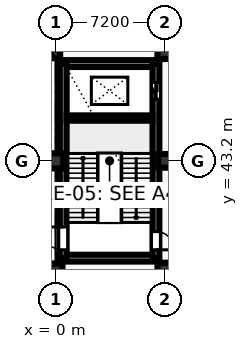
"""IFC4 building model, lengths in metres.
Left out: names, types, materials, properties, quantities, classifications, styles, units other than length and angle.
Written with IfcOpenShell. Run it as: python <this file> out.ifc"""

import sys

from ifc_helpers import new_model, si_unit, direction, frame, frame_2d, origin, origin_2d, place, context, subcontext, project, spatial, rectangle, circle, extrude, element, fill, save


model = new_model("IFC4")
c1 = context("Model", 3, precision=1e-05, world=origin(), true_north=direction((0.0, 1.0)))
c2 = subcontext(c1, "Body", "Model", "MODEL_VIEW")
j1 = project(units=[si_unit("LENGTHUNIT", "METRE"), si_unit("PLANEANGLEUNIT", "RADIAN")], contexts=[c1])
p1 = place(None, origin())
s1 = spatial("IfcSite", under=j1, at=p1, CompositionType="ELEMENT")
p2 = place(p1, origin())
s2 = spatial("IfcBuilding", under=s1, at=p2, CompositionType="ELEMENT")
p3 = place(p2, origin())
s3 = spatial("IfcBuildingStorey", under=s2, at=p3, CompositionType="ELEMENT", Elevation=0.0)
p4 = place(p3, frame((0.0, 36.0, 0.0), z_axis=(0.0, 0.0, 1.0), x_axis=(1.0, 0.0, 0.0)))
e1 = element("IfcColumn", 1, at=p4, inside=s3, PredefinedType="COLUMN", context=c2, shape_type="SweptSolid", body=[
    extrude(rectangle(XDim=0.9, YDim=0.9, at=origin_2d()), origin(), (0.0, 0.0, 1.0), 5.4),
])
p5 = place(p3, frame((0.0, 43.2, 0.0), z_axis=(0.0, 0.0, 1.0), x_axis=(1.0, 0.0, 0.0)))
e2 = element("IfcColumn", 2, at=p5, inside=s3, PredefinedType="COLUMN", context=c2, shape_type="SweptSolid", body=[
    extrude(circle(Radius=0.5, at=origin_2d()), origin(), (0.0, 0.0, 1.0), 5.4),
])
p6 = place(p3, frame((0.0, 50.4, 0.0), z_axis=(0.0, 0.0, 1.0), x_axis=(1.0, 0.0, 0.0)))
e3 = element("IfcColumn", 3, at=p6, inside=s3, PredefinedType="COLUMN", context=c2, shape_type="SweptSolid", body=[
    extrude(rectangle(XDim=0.6, YDim=0.9, at=origin_2d()), origin(), (0.0, 0.0, 1.0), 5.4),
])
p7 = place(p3, frame((7.2, 36.0, 0.0), z_axis=(0.0, 0.0, 1.0), x_axis=(1.0, 0.0, 0.0)))
e4 = element("IfcColumn", 4, at=p7, inside=s3, PredefinedType="COLUMN", context=c2, shape_type="SweptSolid", body=[
    extrude(rectangle(XDim=1.0, YDim=1.0, at=origin_2d()), origin(), (0.0, 0.0, 1.0), 5.4),
])
p8 = place(p3, frame((7.2, 43.2, 0.0), z_axis=(0.0, 0.0, 1.0), x_axis=(1.0, 0.0, 0.0)))
e5 = element("IfcColumn", 5, at=p8, inside=s3, PredefinedType="COLUMN", context=c2, shape_type="SweptSolid", body=[
    extrude(rectangle(XDim=0.9, YDim=0.9, at=origin_2d()), origin(), (0.0, 0.0, 1.0), 5.4),
])
p9 = place(p3, frame((7.2, 50.4, 0.0), z_axis=(0.0, 0.0, 1.0), x_axis=(1.0, 0.0, 0.0)))
e6 = element("IfcColumn", 6, at=p9, inside=s3, PredefinedType="COLUMN", context=c2, shape_type="SweptSolid", body=[
    extrude(circle(Radius=0.5, at=origin_2d()), origin(), (0.0, 0.0, 1.0), 5.4),
])
for number, where, z_axis, x_axis in (
    (7, (0.5, 36.8, 0.0), (0.0, 0.0, 1.0), (1.0, 0.0, 0.0)),
    (8, (0.5, 49.6, 0.0), (0.0, 0.0, 1.0), (1.0, 0.0, 0.0)),
):
    element("IfcWall", number, at=place(p3, frame(where, z_axis=z_axis, x_axis=x_axis)), inside=s3, PredefinedType="SHEAR", context=c2, shape_type="SweptSolid", body=[
        extrude(rectangle(XDim=6.1, YDim=0.45, at=frame_2d((3.05, 0.0))), origin(), (0.0, 0.0, 1.0), 5.06),
    ])
p10 = place(p3, frame((0.5, 36.8, 0.0), z_axis=(0.0, 0.0, 1.0), x_axis=(0.0, 1.0, 0.0)))
e9 = element("IfcWall", 9, at=p10, inside=s3, PredefinedType="SHEAR", context=c2, shape_type="SweptSolid", body=[
    extrude(rectangle(XDim=12.8, YDim=0.45, at=frame_2d((6.4, 0.0))), origin(), (0.0, 0.0, 1.0), 5.06),
])
p11 = place(p10, frame((0.55, 0.0, 0.0)))
e10 = element("IfcOpeningElement", 10, at=p11, cuts=e9, PredefinedType="OPENING", context=c2, shape_type="SweptSolid", body=[
    extrude(rectangle(XDim=1.5, YDim=2.25, at=frame_2d((0.75, 1.125))), frame((0.0, 0.235, 0.0), z_axis=(0.0, -1.0, 0.0), x_axis=(1.0, 0.0, 0.0)), (0.0, 0.0, 1.0), 0.47),
])
p12 = place(p3, frame((6.6, 36.8, 0.0), z_axis=(0.0, 0.0, 1.0), x_axis=(0.0, 1.0, 0.0)))
e11 = element("IfcWall", 11, at=p12, inside=s3, PredefinedType="SHEAR", context=c2, shape_type="SweptSolid", body=[
    extrude(rectangle(XDim=12.8, YDim=0.45, at=frame_2d((6.4, 0.0))), origin(), (0.0, 0.0, 1.0), 5.06),
])
p13 = place(p12, frame((0.55, 0.0, 0.0)))
e12 = element("IfcOpeningElement", 12, at=p13, cuts=e11, PredefinedType="OPENING", context=c2, shape_type="SweptSolid", body=[
    extrude(rectangle(XDim=1.2, YDim=2.25, at=frame_2d((0.6, 1.125))), frame((0.0, 0.235, 0.0), z_axis=(0.0, -1.0, 0.0), x_axis=(1.0, 0.0, 0.0)), (0.0, 0.0, 1.0), 0.47),
])
p14 = place(p12, frame((10.458, 0.0, 0.0)))
e13 = element("IfcOpeningElement", 13, at=p14, cuts=e11, PredefinedType="OPENING", context=c2, shape_type="SweptSolid", body=[
    extrude(rectangle(XDim=1.1, YDim=2.2, at=frame_2d((0.55, 1.1))), frame((0.0, 0.235, 0.0), z_axis=(0.0, -1.0, 0.0), x_axis=(1.0, 0.0, 0.0)), (0.0, 0.0, 1.0), 0.47),
])
p15 = place(p3, frame((0.725, 46.016, 0.0), z_axis=(0.0, 0.0, 1.0), x_axis=(1.0, 0.0, 0.0)))
e14 = element("IfcWall", 14, at=p15, inside=s3, PredefinedType="SHEAR", context=c2, shape_type="SweptSolid", body=[
    extrude(rectangle(XDim=5.65, YDim=0.35, at=frame_2d((2.825, 0.0))), origin(), (0.0, 0.0, 1.0), 5.06),
])
p16 = place(p13, frame((1.2, 0.0, 0.0), z_axis=(0.0, 0.0, 1.0), x_axis=(-1.0, 0.0, 0.0)))
e15 = element("IfcDoor", 15, at=p16, inside=s3, OperationType="SINGLE_SWING_LEFT", PredefinedType="DOOR", context=c2, shape_type="SweptSolid", body=[
    extrude(rectangle(XDim=1.2, YDim=2.25, at=frame_2d((0.6, 1.125))), frame((0.0, 0.025, 0.0), z_axis=(0.0, -1.0, 0.0), x_axis=(1.0, 0.0, 0.0)), (0.0, 0.0, 1.0), 0.05),
])
fill(e12, e15)
p17 = place(p11, origin())
e16 = element("IfcDoor", 16, at=p17, inside=s3, OperationType="SINGLE_SWING_RIGHT", PredefinedType="DOOR", context=c2, shape_type="SweptSolid", body=[
    extrude(rectangle(XDim=1.5, YDim=2.25, at=frame_2d((0.75, 1.125))), frame((0.0, 0.025, 0.0), z_axis=(0.0, -1.0, 0.0), x_axis=(1.0, 0.0, 0.0)), (0.0, 0.0, 1.0), 0.05),
])
fill(e10, e16)
p18 = place(p14, origin())
e17 = element("IfcDoor", 17, at=p18, inside=s3, OperationType="SLIDING_TO_RIGHT", PredefinedType="DOOR", context=c2, shape_type="SweptSolid", body=[
    extrude(rectangle(XDim=1.1, YDim=2.2, at=frame_2d((0.55, 1.1))), frame((0.0, 0.025, 0.0), z_axis=(0.0, -1.0, 0.0), x_axis=(1.0, 0.0, 0.0)), (0.0, 0.0, 1.0), 0.05),
])
fill(e13, e17)
save(model, sys.argv[1])
